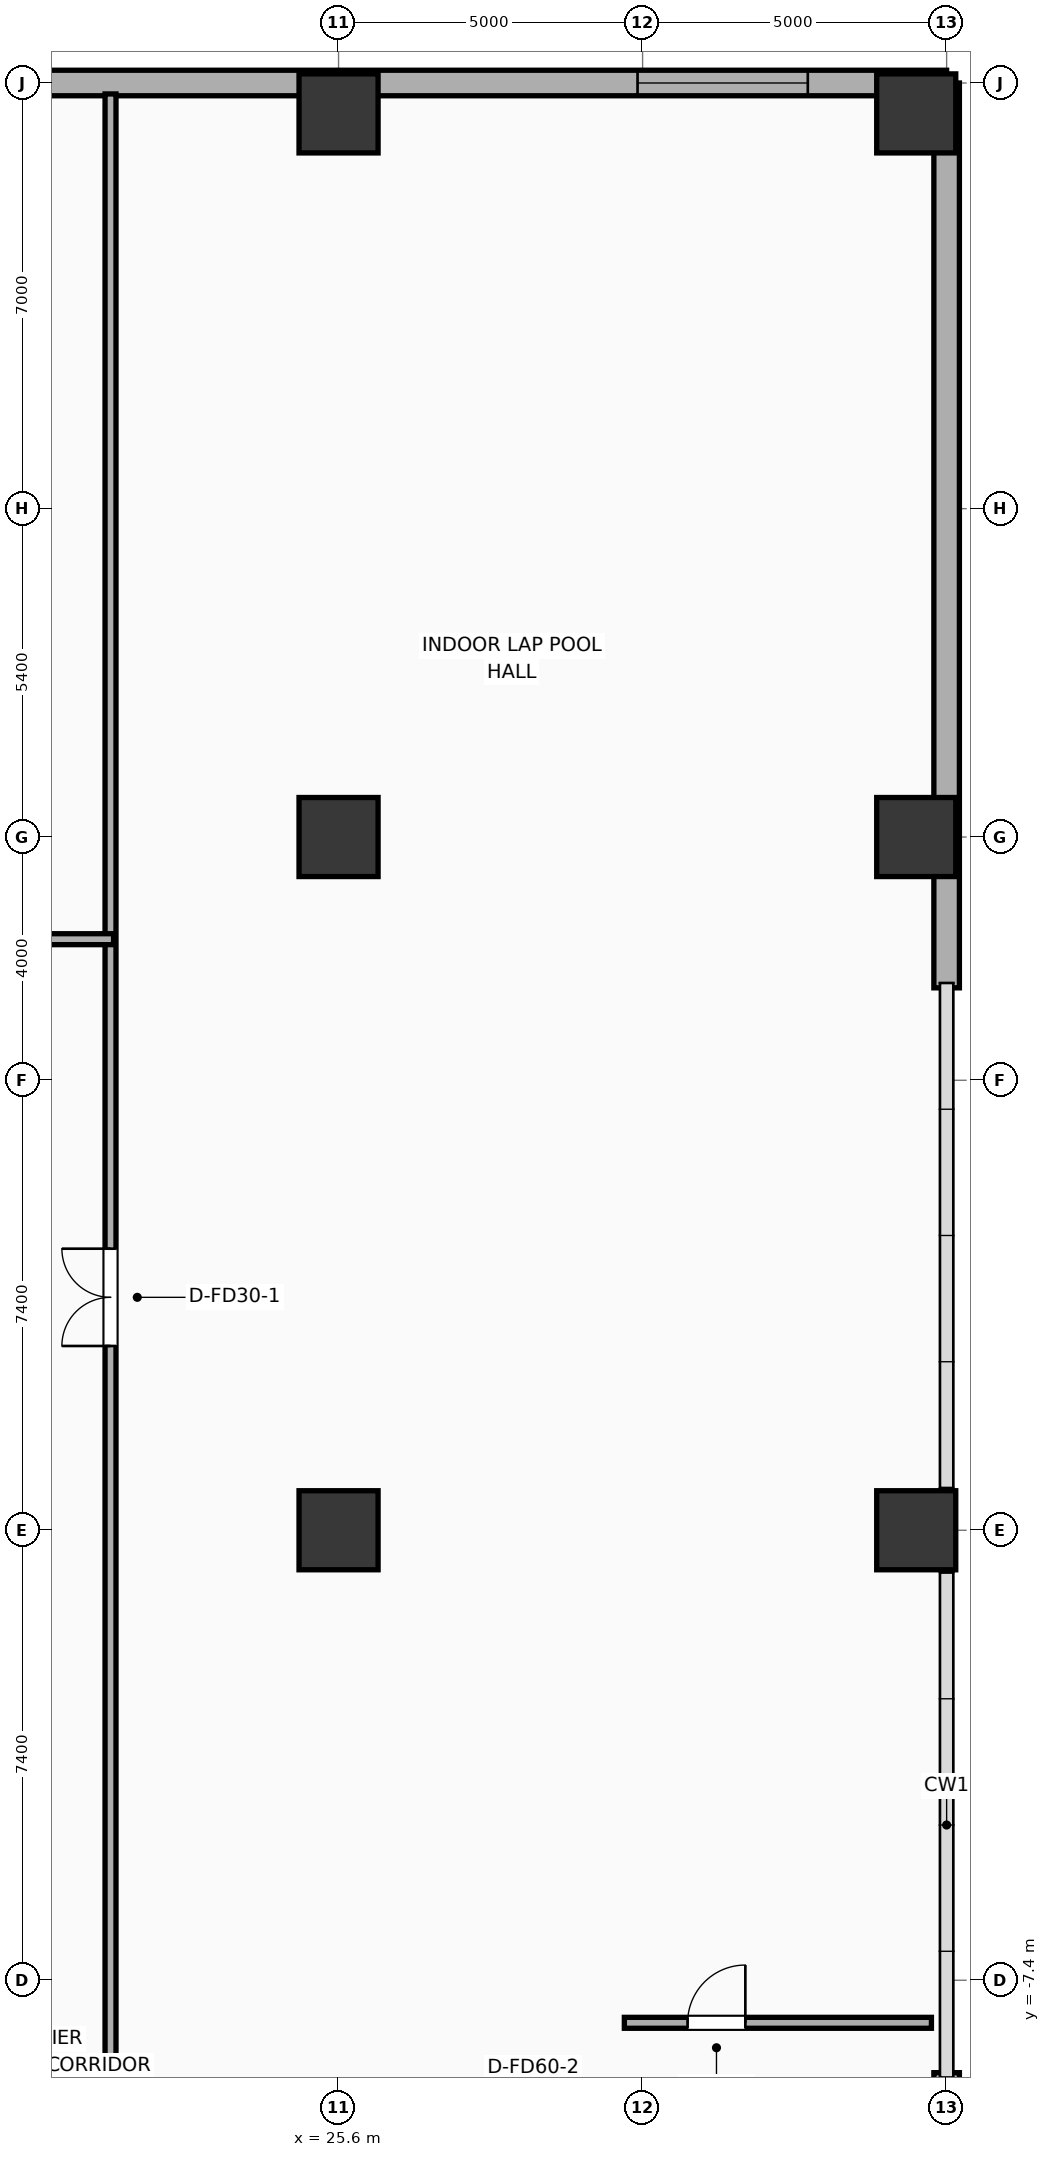
"""IFC4 building model, lengths in metres.
Left out: names, types, materials, properties, quantities, classifications, styles, units other than length and angle.
Written with IfcOpenShell. Run it as: python <this file> out.ifc"""

import sys

from ifc_helpers import new_model, si_unit, direction, frame, frame_2d, origin, origin_2d, place, context, subcontext, project, spatial, rectangle, extrude, element, fill, save


model = new_model("IFC4")
c1 = context("Model", 3, precision=1e-05, world=origin(), true_north=direction((0.0, 1.0)))
c2 = subcontext(c1, "Body", "Model", "MODEL_VIEW")
j1 = project(units=[si_unit("LENGTHUNIT", "METRE"), si_unit("PLANEANGLEUNIT", "RADIAN")], contexts=[c1])
p1 = place(None, origin())
s1 = spatial("IfcSite", under=j1, at=p1, CompositionType="ELEMENT")
p2 = place(p1, origin())
s2 = spatial("IfcBuilding", under=s1, at=p2, CompositionType="ELEMENT")
p3 = place(p2, frame((0.0, 0.0, 10.4)))
s3 = spatial("IfcBuildingStorey", under=s2, at=p3, CompositionType="ELEMENT", Elevation=10.4)
for number, where, z_axis, x_axis in (
    (1, (25.6, 0.0, 0.0), (0.0, 0.0, 1.0), (1.0, 0.0, 0.0)),
    (2, (25.6, 11.4, 0.0), (0.0, 0.0, 1.0), (1.0, 0.0, 0.0)),
    (3, (25.6, 23.3, 0.0), (0.0, 0.0, 1.0), (1.0, 0.0, 0.0)),
    (4, (35.1, 0.0, 0.0), (0.0, 0.0, 1.0), (1.0, 0.0, 0.0)),
    (5, (35.1, 11.4, 0.0), (0.0, 0.0, 1.0), (1.0, 0.0, 0.0)),
    (6, (35.1, 23.3, 0.0), (0.0, 0.0, 1.0), (1.0, 0.0, 0.0)),
):
    element("IfcColumn", number, at=place(p3, frame(where, z_axis=z_axis, x_axis=x_axis)), inside=s3, PredefinedType="COLUMN", context=c2, shape_type="SweptSolid", body=[
        extrude(rectangle(XDim=1.3, YDim=1.3, at=origin_2d()), origin(), (0.0, 0.0, 1.0), 5.2),
    ])
for number, where, z_axis, x_axis in (
    (7, (35.6, -23.8, 0.0), (0.0, 0.0, 1.0), (0.0, 1.0, 0.0)),
    (8, (35.6, 8.92, 0.0), (0.0, 0.0, 1.0), (0.0, 1.0, 0.0)),
):
    element("IfcWall", number, at=place(p3, frame(where, z_axis=z_axis, x_axis=x_axis)), inside=s3, PredefinedType="ELEMENTEDWALL", context=c2, shape_type="SweptSolid", body=[
        extrude(rectangle(XDim=14.88, YDim=0.42, at=frame_2d((7.44, 0.0))), origin(), (0.0, 0.0, 1.0), 4.92),
    ])
p4 = place(p3, frame((35.6, 23.8, 0.0), z_axis=(0.0, 0.0, 1.0), x_axis=(-1.0, 0.0, 0.0)))
e9 = element("IfcWall", 9, at=p4, inside=s3, PredefinedType="ELEMENTEDWALL", context=c2, shape_type="SweptSolid", body=[
    extrude(rectangle(XDim=22.1, YDim=0.42, at=frame_2d((11.05, 0.0))), origin(), (0.0, 0.0, 1.0), 4.92),
])
p5 = place(p4, frame((2.283, 0.0, 0.65)))
e10 = element("IfcOpeningElement", 10, at=p5, cuts=e9, PredefinedType="OPENING", context=c2, shape_type="SweptSolid", body=[
    extrude(rectangle(XDim=2.8, YDim=2.6, at=frame_2d((1.4, 1.3))), frame((0.0, 0.22, 0.0), z_axis=(0.0, -1.0, 0.0), x_axis=(1.0, 0.0, 0.0)), (0.0, 0.0, 1.0), 0.44),
])
p6 = place(p4, frame((17.017, 0.0, 0.65)))
e11 = element("IfcOpeningElement", 11, at=p6, cuts=e9, PredefinedType="OPENING", context=c2, shape_type="SweptSolid", body=[
    extrude(rectangle(XDim=2.8, YDim=2.6, at=frame_2d((1.4, 1.3))), frame((0.0, 0.22, 0.0), z_axis=(0.0, -1.0, 0.0), x_axis=(1.0, 0.0, 0.0)), (0.0, 0.0, 1.0), 0.44),
])
p7 = place(p3, frame((21.85, -10.5, 0.0), z_axis=(0.0, 0.0, 1.0), x_axis=(0.0, 1.0, 0.0)))
e12 = element("IfcWall", 12, at=p7, inside=s3, PredefinedType="PARTITIONING", context=c2, shape_type="SweptSolid", body=[
    extrude(rectangle(XDim=34.12, YDim=0.18, at=frame_2d((17.06, 0.0))), origin(), (0.0, 0.0, 1.0), 4.92),
])
p8 = place(p7, frame((13.531, 0.0, 0.0)))
e13 = element("IfcOpeningElement", 13, at=p8, cuts=e12, PredefinedType="OPENING", context=c2, shape_type="SweptSolid", body=[
    extrude(rectangle(XDim=1.6, YDim=2.05, at=frame_2d((0.8, 1.025))), frame((0.0, 0.1, 0.0), z_axis=(0.0, -1.0, 0.0), x_axis=(1.0, 0.0, 0.0)), (0.0, 0.0, 1.0), 0.2),
])
p9 = place(p3, frame((30.3, -8.1, 0.0), z_axis=(0.0, 0.0, 1.0), x_axis=(1.0, 0.0, 0.0)))
e14 = element("IfcWall", 14, at=p9, inside=s3, PredefinedType="PARTITIONING", context=c2, shape_type="SweptSolid", body=[
    extrude(rectangle(XDim=5.05, YDim=0.18, at=frame_2d((2.525, 0.0))), origin(), (0.0, 0.0, 1.0), 4.92),
])
p10 = place(p9, frame((1.04, 0.0, 0.0)))
e15 = element("IfcOpeningElement", 15, at=p10, cuts=e14, PredefinedType="OPENING", context=c2, shape_type="SweptSolid", body=[
    extrude(rectangle(XDim=0.95, YDim=2.05, at=frame_2d((0.475, 1.025))), frame((0.0, 0.1, 0.0), z_axis=(0.0, -1.0, 0.0), x_axis=(1.0, 0.0, 0.0)), (0.0, 0.0, 1.0), 0.2),
])
p11 = place(p3, frame((13.52, 9.72, 0.0), z_axis=(0.0, 0.0, 1.0), x_axis=(1.0, 0.0, 0.0)))
e16 = element("IfcWall", 16, at=p11, inside=s3, PredefinedType="PARTITIONING", context=c2, shape_type="SweptSolid", body=[
    extrude(rectangle(XDim=8.38, YDim=0.18, at=frame_2d((4.19, 0.0))), origin(), (0.0, 0.0, 1.0), 4.92),
])
p12 = place(p11, frame((3.39, 0.0, 0.0)))
e17 = element("IfcOpeningElement", 17, at=p12, cuts=e16, PredefinedType="OPENING", context=c2, shape_type="SweptSolid", body=[
    extrude(rectangle(XDim=1.6, YDim=2.05, at=frame_2d((0.8, 1.025))), frame((0.0, 0.1, 0.0), z_axis=(0.0, -1.0, 0.0), x_axis=(1.0, 0.0, 0.0)), (0.0, 0.0, 1.0), 0.2),
])
p13 = place(p5, origin())
e18 = element("IfcWindow", 18, at=p13, inside=s3, PartitioningType="SINGLE_PANEL", PredefinedType="WINDOW", context=c2, shape_type="SweptSolid", body=[
    extrude(rectangle(XDim=2.8, YDim=2.6, at=frame_2d((1.4, 1.3))), frame((0.0, 0.03, 0.0), z_axis=(0.0, -1.0, 0.0), x_axis=(1.0, 0.0, 0.0)), (0.0, 0.0, 1.0), 0.06),
])
fill(e10, e18)
p14 = place(p8, origin())
e19 = element("IfcDoor", 19, at=p14, inside=s3, OperationType="DOUBLE_DOOR_SINGLE_SWING", PredefinedType="DOOR", context=c2, shape_type="SweptSolid", body=[
    extrude(rectangle(XDim=1.6, YDim=2.05, at=frame_2d((0.8, 1.025))), frame((0.0, 0.025, 0.0), z_axis=(0.0, -1.0, 0.0), x_axis=(1.0, 0.0, 0.0)), (0.0, 0.0, 1.0), 0.05),
])
fill(e13, e19)
p15 = place(p10, origin())
e20 = element("IfcDoor", 20, at=p15, inside=s3, OperationType="SINGLE_SWING_RIGHT", PredefinedType="DOOR", context=c2, shape_type="SweptSolid", body=[
    extrude(rectangle(XDim=0.95, YDim=2.05, at=frame_2d((0.475, 1.025))), frame((0.0, 0.025, 0.0), z_axis=(0.0, -1.0, 0.0), x_axis=(1.0, 0.0, 0.0)), (0.0, 0.0, 1.0), 0.05),
])
fill(e15, e20)
save(model, sys.argv[1])
